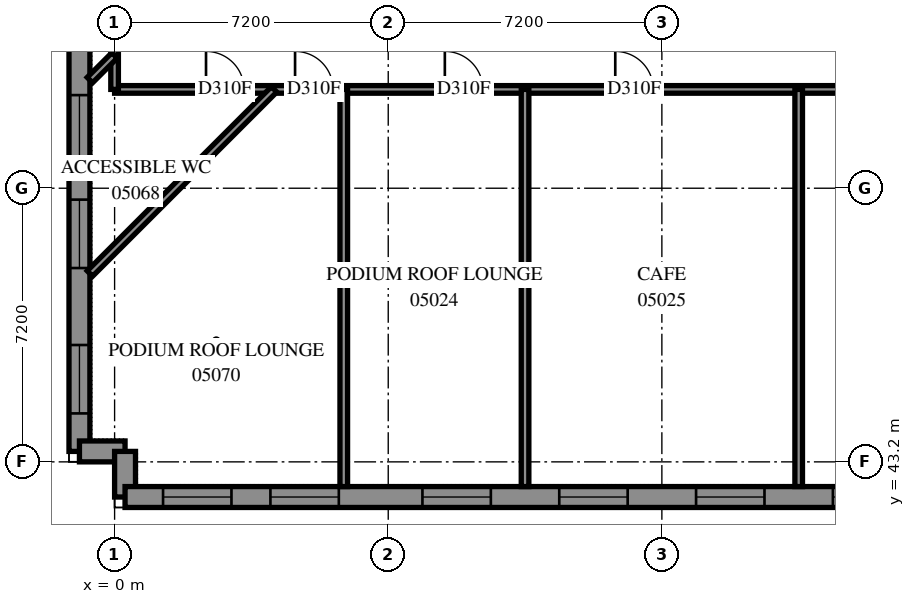
"""IFC4 building model, lengths in metres.
Left out: names, types, materials, properties, quantities, classifications, styles, units other than length and angle.
Written with IfcOpenShell. Run it as: python <this file> out.ifc"""

import sys

from ifc_helpers import new_model, si_unit, direction, frame, frame_2d, origin, place, context, subcontext, project, spatial, polyline, rectangle, outline, extrude, element, fill, save


model = new_model("IFC4")
c1 = context("Model", 3, precision=1e-05, world=origin(), true_north=direction((0.0, 1.0)))
c2 = subcontext(c1, "Body", "Model", "MODEL_VIEW")
j1 = project(units=[si_unit("LENGTHUNIT", "METRE"), si_unit("PLANEANGLEUNIT", "RADIAN")], contexts=[c1])
p1 = place(None, origin())
s1 = spatial("IfcSite", under=j1, at=p1, CompositionType="ELEMENT")
p2 = place(p1, origin())
s2 = spatial("IfcBuilding", under=s1, at=p2, CompositionType="ELEMENT")
p3 = place(p2, frame((0.0, 0.0, 22.8)))
s3 = spatial("IfcBuildingStorey", under=s2, at=p3, CompositionType="ELEMENT", Elevation=22.8)
p4 = place(p3, frame((-0.925, 71.725, 0.0), z_axis=(0.0, 0.0, 1.0), x_axis=(0.0, -1.0, 0.0)))
e1 = element("IfcWall", 1, at=p4, inside=s3, PredefinedType="SOLIDWALL", context=c2, shape_type="SweptSolid", body=[
    extrude(outline(polyline([(-0.275, -0.275), (28.525, -0.275), (27.975, 0.275), (0.275, 0.275), (-0.275, -0.275)])), origin(), (0.0, 0.0, 1.0), 3.9),
])
p5 = place(p4, frame((1.0, 0.0, 0.7)))
e2 = element("IfcOpeningElement", 2, at=p5, cuts=e1, PredefinedType="OPENING", context=c2, shape_type="SweptSolid", body=[
    extrude(rectangle(XDim=1.8, YDim=2.4, at=frame_2d((0.9, 1.2))), frame((0.0, 0.285, 0.0), z_axis=(0.0, -1.0, 0.0), x_axis=(1.0, 0.0, 0.0)), (0.0, 0.0, 1.0), 0.57),
])
p6 = place(p4, frame((4.225, 0.0, 0.7)))
e3 = element("IfcOpeningElement", 3, at=p6, cuts=e1, PredefinedType="OPENING", context=c2, shape_type="SweptSolid", body=[
    extrude(rectangle(XDim=1.8, YDim=2.4, at=frame_2d((0.9, 1.2))), frame((0.0, 0.285, 0.0), z_axis=(0.0, -1.0, 0.0), x_axis=(1.0, 0.0, 0.0)), (0.0, 0.0, 1.0), 0.57),
])
p7 = place(p4, frame((7.575, 0.0, 0.7)))
e4 = element("IfcOpeningElement", 4, at=p7, cuts=e1, PredefinedType="OPENING", context=c2, shape_type="SweptSolid", body=[
    extrude(rectangle(XDim=1.8, YDim=2.4, at=frame_2d((0.9, 1.2))), frame((0.0, 0.285, 0.0), z_axis=(0.0, -1.0, 0.0), x_axis=(1.0, 0.0, 0.0)), (0.0, 0.0, 1.0), 0.57),
])
p8 = place(p4, frame((14.775, 0.0, 0.7)))
e5 = element("IfcOpeningElement", 5, at=p8, cuts=e1, PredefinedType="OPENING", context=c2, shape_type="SweptSolid", body=[
    extrude(rectangle(XDim=1.8, YDim=2.4, at=frame_2d((0.9, 1.2))), frame((0.0, 0.285, 0.0), z_axis=(0.0, -1.0, 0.0), x_axis=(1.0, 0.0, 0.0)), (0.0, 0.0, 1.0), 0.57),
])
p9 = place(p4, frame((18.875, 0.0, 0.7)))
e6 = element("IfcOpeningElement", 6, at=p9, cuts=e1, PredefinedType="OPENING", context=c2, shape_type="SweptSolid", body=[
    extrude(rectangle(XDim=1.8, YDim=2.4, at=frame_2d((0.9, 1.2))), frame((0.0, 0.285, 0.0), z_axis=(0.0, -1.0, 0.0), x_axis=(1.0, 0.0, 0.0)), (0.0, 0.0, 1.0), 0.57),
])
p10 = place(p4, frame((21.625, 0.0, 0.7)))
e7 = element("IfcOpeningElement", 7, at=p10, cuts=e1, PredefinedType="OPENING", context=c2, shape_type="SweptSolid", body=[
    extrude(rectangle(XDim=1.8, YDim=2.4, at=frame_2d((0.9, 1.2))), frame((0.0, 0.285, 0.0), z_axis=(0.0, -1.0, 0.0), x_axis=(1.0, 0.0, 0.0)), (0.0, 0.0, 1.0), 0.57),
])
p11 = place(p4, frame((25.45, 0.0, 0.7)))
e8 = element("IfcOpeningElement", 8, at=p11, cuts=e1, PredefinedType="OPENING", context=c2, shape_type="SweptSolid", body=[
    extrude(rectangle(XDim=1.8, YDim=2.4, at=frame_2d((0.9, 1.2))), frame((0.0, 0.285, 0.0), z_axis=(0.0, -1.0, 0.0), x_axis=(1.0, 0.0, 0.0)), (0.0, 0.0, 1.0), 0.57),
])
p12 = place(p4, frame((11.775, 0.0, 0.45)))
e9 = element("IfcOpeningElement", 9, at=p12, cuts=e1, PredefinedType="OPENING", context=c2, shape_type="SweptSolid", body=[
    extrude(rectangle(XDim=1.3, YDim=2.5, at=frame_2d((0.65, 1.25))), frame((0.0, 0.285, 0.0), z_axis=(0.0, -1.0, 0.0), x_axis=(1.0, 0.0, 0.0)), (0.0, 0.0, 1.0), 0.57),
])
p13 = place(p3, frame((-0.925, 43.475, 0.0), z_axis=(0.0, 0.0, 1.0), x_axis=(1.0, 0.0, 0.0)))
e10 = element("IfcWall", 10, at=p13, inside=s3, PredefinedType="SOLIDWALL", context=c2, shape_type="SweptSolid", body=[
    extrude(outline(polyline([(-0.275, -0.275), (0.925, -0.275), (1.475, 0.275), (0.275, 0.275), (-0.275, -0.275)])), origin(), (0.0, 0.0, 1.0), 3.9),
])
p14 = place(p3, frame((0.275, 43.475, 0.0), z_axis=(0.0, 0.0, 1.0), x_axis=(0.0, -1.0, 0.0)))
e11 = element("IfcWall", 11, at=p14, inside=s3, PredefinedType="SOLIDWALL", context=c2, shape_type="SweptSolid", body=[
    extrude(outline(polyline([(0.275, -0.275), (1.475, -0.275), (0.925, 0.275), (-0.275, 0.275), (0.275, -0.275)])), origin(), (0.0, 0.0, 1.0), 3.9),
])
p15 = place(p3, frame((0.275, 42.275, 0.0), z_axis=(0.0, 0.0, 1.0), x_axis=(1.0, 0.0, 0.0)))
e12 = element("IfcWall", 12, at=p15, inside=s3, PredefinedType="SOLIDWALL", context=c2, shape_type="SweptSolid", body=[
    extrude(outline(polyline([(-0.275, -0.275), (76.681, -0.275), (76.909, 0.275), (0.275, 0.275), (-0.275, -0.275)])), origin(), (0.0, 0.0, 1.0), 3.9),
])
p16 = place(p15, frame((1.0, 0.0, 0.7)))
e13 = element("IfcOpeningElement", 13, at=p16, cuts=e12, PredefinedType="OPENING", context=c2, shape_type="SweptSolid", body=[
    extrude(rectangle(XDim=1.8, YDim=2.4, at=frame_2d((0.9, 1.2))), frame((0.0, 0.285, 0.0), z_axis=(0.0, -1.0, 0.0), x_axis=(1.0, 0.0, 0.0)), (0.0, 0.0, 1.0), 0.57),
])
p17 = place(p15, frame((3.825, 0.0, 0.7)))
e14 = element("IfcOpeningElement", 14, at=p17, cuts=e12, PredefinedType="OPENING", context=c2, shape_type="SweptSolid", body=[
    extrude(rectangle(XDim=1.8, YDim=2.4, at=frame_2d((0.9, 1.2))), frame((0.0, 0.285, 0.0), z_axis=(0.0, -1.0, 0.0), x_axis=(1.0, 0.0, 0.0)), (0.0, 0.0, 1.0), 0.57),
])
p18 = place(p15, frame((7.825, 0.0, 0.7)))
e15 = element("IfcOpeningElement", 15, at=p18, cuts=e12, PredefinedType="OPENING", context=c2, shape_type="SweptSolid", body=[
    extrude(rectangle(XDim=1.8, YDim=2.4, at=frame_2d((0.9, 1.2))), frame((0.0, 0.285, 0.0), z_axis=(0.0, -1.0, 0.0), x_axis=(1.0, 0.0, 0.0)), (0.0, 0.0, 1.0), 0.57),
])
p19 = place(p15, frame((11.425, 0.0, 0.7)))
e16 = element("IfcOpeningElement", 16, at=p19, cuts=e12, PredefinedType="OPENING", context=c2, shape_type="SweptSolid", body=[
    extrude(rectangle(XDim=1.8, YDim=2.4, at=frame_2d((0.9, 1.2))), frame((0.0, 0.285, 0.0), z_axis=(0.0, -1.0, 0.0), x_axis=(1.0, 0.0, 0.0)), (0.0, 0.0, 1.0), 0.57),
])
p20 = place(p15, frame((15.025, 0.0, 0.7)))
e17 = element("IfcOpeningElement", 17, at=p20, cuts=e12, PredefinedType="OPENING", context=c2, shape_type="SweptSolid", body=[
    extrude(rectangle(XDim=1.8, YDim=2.4, at=frame_2d((0.9, 1.2))), frame((0.0, 0.285, 0.0), z_axis=(0.0, -1.0, 0.0), x_axis=(1.0, 0.0, 0.0)), (0.0, 0.0, 1.0), 0.57),
])
p21 = place(p15, frame((18.625, 0.0, 0.7)))
e18 = element("IfcOpeningElement", 18, at=p21, cuts=e12, PredefinedType="OPENING", context=c2, shape_type="SweptSolid", body=[
    extrude(rectangle(XDim=1.8, YDim=2.4, at=frame_2d((0.9, 1.2))), frame((0.0, 0.285, 0.0), z_axis=(0.0, -1.0, 0.0), x_axis=(1.0, 0.0, 0.0)), (0.0, 0.0, 1.0), 0.57),
])
p22 = place(p15, frame((22.225, 0.0, 0.7)))
e19 = element("IfcOpeningElement", 19, at=p22, cuts=e12, PredefinedType="OPENING", context=c2, shape_type="SweptSolid", body=[
    extrude(rectangle(XDim=1.8, YDim=2.4, at=frame_2d((0.9, 1.2))), frame((0.0, 0.285, 0.0), z_axis=(0.0, -1.0, 0.0), x_axis=(1.0, 0.0, 0.0)), (0.0, 0.0, 1.0), 0.57),
])
p23 = place(p15, frame((25.825, 0.0, 0.7)))
e20 = element("IfcOpeningElement", 20, at=p23, cuts=e12, PredefinedType="OPENING", context=c2, shape_type="SweptSolid", body=[
    extrude(rectangle(XDim=1.8, YDim=2.4, at=frame_2d((0.9, 1.2))), frame((0.0, 0.285, 0.0), z_axis=(0.0, -1.0, 0.0), x_axis=(1.0, 0.0, 0.0)), (0.0, 0.0, 1.0), 0.57),
])
p24 = place(p15, frame((29.425, 0.0, 0.7)))
e21 = element("IfcOpeningElement", 21, at=p24, cuts=e12, PredefinedType="OPENING", context=c2, shape_type="SweptSolid", body=[
    extrude(rectangle(XDim=1.8, YDim=2.4, at=frame_2d((0.9, 1.2))), frame((0.0, 0.285, 0.0), z_axis=(0.0, -1.0, 0.0), x_axis=(1.0, 0.0, 0.0)), (0.0, 0.0, 1.0), 0.57),
])
p25 = place(p15, frame((33.025, 0.0, 0.7)))
e22 = element("IfcOpeningElement", 22, at=p25, cuts=e12, PredefinedType="OPENING", context=c2, shape_type="SweptSolid", body=[
    extrude(rectangle(XDim=1.8, YDim=2.4, at=frame_2d((0.9, 1.2))), frame((0.0, 0.285, 0.0), z_axis=(0.0, -1.0, 0.0), x_axis=(1.0, 0.0, 0.0)), (0.0, 0.0, 1.0), 0.57),
])
p26 = place(p15, frame((36.625, 0.0, 0.7)))
e23 = element("IfcOpeningElement", 23, at=p26, cuts=e12, PredefinedType="OPENING", context=c2, shape_type="SweptSolid", body=[
    extrude(rectangle(XDim=1.8, YDim=2.4, at=frame_2d((0.9, 1.2))), frame((0.0, 0.285, 0.0), z_axis=(0.0, -1.0, 0.0), x_axis=(1.0, 0.0, 0.0)), (0.0, 0.0, 1.0), 0.57),
])
p27 = place(p15, frame((40.225, 0.0, 0.7)))
e24 = element("IfcOpeningElement", 24, at=p27, cuts=e12, PredefinedType="OPENING", context=c2, shape_type="SweptSolid", body=[
    extrude(rectangle(XDim=1.8, YDim=2.4, at=frame_2d((0.9, 1.2))), frame((0.0, 0.285, 0.0), z_axis=(0.0, -1.0, 0.0), x_axis=(1.0, 0.0, 0.0)), (0.0, 0.0, 1.0), 0.57),
])
p28 = place(p15, frame((43.825, 0.0, 0.7)))
e25 = element("IfcOpeningElement", 25, at=p28, cuts=e12, PredefinedType="OPENING", context=c2, shape_type="SweptSolid", body=[
    extrude(rectangle(XDim=1.8, YDim=2.4, at=frame_2d((0.9, 1.2))), frame((0.0, 0.285, 0.0), z_axis=(0.0, -1.0, 0.0), x_axis=(1.0, 0.0, 0.0)), (0.0, 0.0, 1.0), 0.57),
])
p29 = place(p15, frame((47.425, 0.0, 0.7)))
e26 = element("IfcOpeningElement", 26, at=p29, cuts=e12, PredefinedType="OPENING", context=c2, shape_type="SweptSolid", body=[
    extrude(rectangle(XDim=1.8, YDim=2.4, at=frame_2d((0.9, 1.2))), frame((0.0, 0.285, 0.0), z_axis=(0.0, -1.0, 0.0), x_axis=(1.0, 0.0, 0.0)), (0.0, 0.0, 1.0), 0.57),
])
p30 = place(p15, frame((51.025, 0.0, 0.7)))
e27 = element("IfcOpeningElement", 27, at=p30, cuts=e12, PredefinedType="OPENING", context=c2, shape_type="SweptSolid", body=[
    extrude(rectangle(XDim=1.8, YDim=2.4, at=frame_2d((0.9, 1.2))), frame((0.0, 0.285, 0.0), z_axis=(0.0, -1.0, 0.0), x_axis=(1.0, 0.0, 0.0)), (0.0, 0.0, 1.0), 0.57),
])
p31 = place(p15, frame((54.625, 0.0, 0.7)))
e28 = element("IfcOpeningElement", 28, at=p31, cuts=e12, PredefinedType="OPENING", context=c2, shape_type="SweptSolid", body=[
    extrude(rectangle(XDim=1.8, YDim=2.4, at=frame_2d((0.9, 1.2))), frame((0.0, 0.285, 0.0), z_axis=(0.0, -1.0, 0.0), x_axis=(1.0, 0.0, 0.0)), (0.0, 0.0, 1.0), 0.57),
])
p32 = place(p15, frame((58.225, 0.0, 0.7)))
e29 = element("IfcOpeningElement", 29, at=p32, cuts=e12, PredefinedType="OPENING", context=c2, shape_type="SweptSolid", body=[
    extrude(rectangle(XDim=1.8, YDim=2.4, at=frame_2d((0.9, 1.2))), frame((0.0, 0.285, 0.0), z_axis=(0.0, -1.0, 0.0), x_axis=(1.0, 0.0, 0.0)), (0.0, 0.0, 1.0), 0.57),
])
p33 = place(p15, frame((61.825, 0.0, 0.7)))
e30 = element("IfcOpeningElement", 30, at=p33, cuts=e12, PredefinedType="OPENING", context=c2, shape_type="SweptSolid", body=[
    extrude(rectangle(XDim=1.8, YDim=2.4, at=frame_2d((0.9, 1.2))), frame((0.0, 0.285, 0.0), z_axis=(0.0, -1.0, 0.0), x_axis=(1.0, 0.0, 0.0)), (0.0, 0.0, 1.0), 0.57),
])
p34 = place(p15, frame((65.425, 0.0, 0.7)))
e31 = element("IfcOpeningElement", 31, at=p34, cuts=e12, PredefinedType="OPENING", context=c2, shape_type="SweptSolid", body=[
    extrude(rectangle(XDim=1.8, YDim=2.4, at=frame_2d((0.9, 1.2))), frame((0.0, 0.285, 0.0), z_axis=(0.0, -1.0, 0.0), x_axis=(1.0, 0.0, 0.0)), (0.0, 0.0, 1.0), 0.57),
])
p35 = place(p15, frame((69.025, 0.0, 0.7)))
e32 = element("IfcOpeningElement", 32, at=p35, cuts=e12, PredefinedType="OPENING", context=c2, shape_type="SweptSolid", body=[
    extrude(rectangle(XDim=1.8, YDim=2.4, at=frame_2d((0.9, 1.2))), frame((0.0, 0.285, 0.0), z_axis=(0.0, -1.0, 0.0), x_axis=(1.0, 0.0, 0.0)), (0.0, 0.0, 1.0), 0.57),
])
p36 = place(p15, frame((72.625, 0.0, 0.7)))
e33 = element("IfcOpeningElement", 33, at=p36, cuts=e12, PredefinedType="OPENING", context=c2, shape_type="SweptSolid", body=[
    extrude(rectangle(XDim=1.8, YDim=2.4, at=frame_2d((0.9, 1.2))), frame((0.0, 0.285, 0.0), z_axis=(0.0, -1.0, 0.0), x_axis=(1.0, 0.0, 0.0)), (0.0, 0.0, 1.0), 0.57),
])
p37 = place(p3, frame((0.0, 53.0, 0.0), z_axis=(0.0, 0.0, 1.0), x_axis=(1.0, 0.0, 0.0)))
e34 = element("IfcWall", 34, at=p37, inside=s3, PredefinedType="PARTITIONING", context=c2, shape_type="SweptSolid", body=[
    extrude(rectangle(XDim=54.6, YDim=0.2, at=frame_2d((27.3, 0.0))), origin(), (0.0, 0.0, 1.0), 3.9),
])
p38 = place(p37, frame((8.689, 0.0, 0.0)))
e35 = element("IfcOpeningElement", 35, at=p38, cuts=e34, PredefinedType="OPENING", context=c2, shape_type="SweptSolid", body=[
    extrude(rectangle(XDim=1.0, YDim=2.1, at=frame_2d((0.5, 1.05))), frame((0.0, 0.11, 0.0), z_axis=(0.0, -1.0, 0.0), x_axis=(1.0, 0.0, 0.0)), (0.0, 0.0, 1.0), 0.22),
])
p39 = place(p37, frame((13.174, 0.0, 0.0)))
e36 = element("IfcOpeningElement", 36, at=p39, cuts=e34, PredefinedType="OPENING", context=c2, shape_type="SweptSolid", body=[
    extrude(rectangle(XDim=1.0, YDim=2.1, at=frame_2d((0.5, 1.05))), frame((0.0, 0.11, 0.0), z_axis=(0.0, -1.0, 0.0), x_axis=(1.0, 0.0, 0.0)), (0.0, 0.0, 1.0), 0.22),
])
p40 = place(p37, frame((20.374, 0.0, 0.0)))
e37 = element("IfcOpeningElement", 37, at=p40, cuts=e34, PredefinedType="OPENING", context=c2, shape_type="SweptSolid", body=[
    extrude(rectangle(XDim=1.0, YDim=2.1, at=frame_2d((0.5, 1.05))), frame((0.0, 0.11, 0.0), z_axis=(0.0, -1.0, 0.0), x_axis=(1.0, 0.0, 0.0)), (0.0, 0.0, 1.0), 0.22),
])
p41 = place(p37, frame((27.574, 0.0, 0.0)))
e38 = element("IfcOpeningElement", 38, at=p41, cuts=e34, PredefinedType="OPENING", context=c2, shape_type="SweptSolid", body=[
    extrude(rectangle(XDim=1.0, YDim=2.1, at=frame_2d((0.5, 1.05))), frame((0.0, 0.11, 0.0), z_axis=(0.0, -1.0, 0.0), x_axis=(1.0, 0.0, 0.0)), (0.0, 0.0, 1.0), 0.22),
])
p42 = place(p37, frame((34.774, 0.0, 0.0)))
e39 = element("IfcOpeningElement", 39, at=p42, cuts=e34, PredefinedType="OPENING", context=c2, shape_type="SweptSolid", body=[
    extrude(rectangle(XDim=1.0, YDim=2.1, at=frame_2d((0.5, 1.05))), frame((0.0, 0.11, 0.0), z_axis=(0.0, -1.0, 0.0), x_axis=(1.0, 0.0, 0.0)), (0.0, 0.0, 1.0), 0.22),
])
p43 = place(p37, frame((41.974, 0.0, 0.0)))
e40 = element("IfcOpeningElement", 40, at=p43, cuts=e34, PredefinedType="OPENING", context=c2, shape_type="SweptSolid", body=[
    extrude(rectangle(XDim=1.0, YDim=2.1, at=frame_2d((0.5, 1.05))), frame((0.0, 0.11, 0.0), z_axis=(0.0, -1.0, 0.0), x_axis=(1.0, 0.0, 0.0)), (0.0, 0.0, 1.0), 0.22),
])
p44 = place(p37, frame((49.174, 0.0, 0.0)))
e41 = element("IfcOpeningElement", 41, at=p44, cuts=e34, PredefinedType="OPENING", context=c2, shape_type="SweptSolid", body=[
    extrude(rectangle(XDim=1.0, YDim=2.1, at=frame_2d((0.5, 1.05))), frame((0.0, 0.11, 0.0), z_axis=(0.0, -1.0, 0.0), x_axis=(1.0, 0.0, 0.0)), (0.0, 0.0, 1.0), 0.22),
])
p45 = place(p37, frame((2.406, 0.0, 0.0)))
e42 = element("IfcOpeningElement", 42, at=p45, cuts=e34, PredefinedType="OPENING", context=c2, shape_type="SweptSolid", body=[
    extrude(rectangle(XDim=1.0, YDim=2.1, at=frame_2d((0.5, 1.05))), frame((0.0, 0.11, 0.0), z_axis=(0.0, -1.0, 0.0), x_axis=(1.0, 0.0, 0.0)), (0.0, 0.0, 1.0), 0.22),
])
p46 = place(p37, frame((4.748, 0.0, 0.0)))
e43 = element("IfcOpeningElement", 43, at=p46, cuts=e34, PredefinedType="OPENING", context=c2, shape_type="SweptSolid", body=[
    extrude(rectangle(XDim=1.0, YDim=2.1, at=frame_2d((0.5, 1.05))), frame((0.0, 0.11, 0.0), z_axis=(0.0, -1.0, 0.0), x_axis=(1.0, 0.0, 0.0)), (0.0, 0.0, 1.0), 0.22),
])
for number, where, z_axis, x_axis in (
    (44, (6.03, 42.55, 0.0), (0.0, 0.0, 1.0), (0.0, 1.0, 0.0)),
    (45, (10.8, 42.55, 0.0), (0.0, 0.0, 1.0), (0.0, 1.0, 0.0)),
    (46, (18.0, 42.55, 0.0), (0.0, 0.0, 1.0), (0.0, 1.0, 0.0)),
):
    element("IfcWall", number, at=place(p3, frame(where, z_axis=z_axis, x_axis=x_axis)), inside=s3, PredefinedType="PARTITIONING", context=c2, shape_type="SweptSolid", body=[
        extrude(rectangle(XDim=10.45, YDim=0.2, at=frame_2d((5.225, 0.0))), origin(), (0.0, 0.0, 1.0), 3.9),
    ])
p47 = place(p3, frame((-0.65, 48.154, 0.0), z_axis=(0.0, 0.0, 1.0), x_axis=(0.7070994865, 0.7071140758, 0.0)))
e47 = element("IfcWall", 47, at=p47, inside=s3, PredefinedType="PARTITIONING", context=c2, shape_type="SweptSolid", body=[
    extrude(rectangle(XDim=6.854, YDim=0.2, at=frame_2d((3.427, 0.0))), origin(), (0.0, 0.0, 1.0), 3.9),
])
p48 = place(p3, frame((0.0, 53.0, 0.0), z_axis=(0.0, 0.0, 1.0), x_axis=(0.0, 1.0, 0.0)))
e48 = element("IfcWall", 48, at=p48, inside=s3, PredefinedType="PARTITIONING", context=c2, shape_type="SweptSolid", body=[
    extrude(rectangle(XDim=2.0, YDim=0.2, at=frame_2d((1.0, 0.0))), origin(), (0.0, 0.0, 1.0), 3.9),
])
p49 = place(p3, frame((-0.65, 53.246, 0.0), z_axis=(0.0, 0.0, 1.0), x_axis=(0.7071612431, 0.707052315, 0.0)))
e49 = element("IfcWall", 49, at=p49, inside=s3, PredefinedType="PARTITIONING", context=c2, shape_type="SweptSolid", body=[
    extrude(rectangle(XDim=0.918, YDim=0.2, at=frame_2d((0.459, 0.0))), origin(), (0.0, 0.0, 1.0), 3.9),
])
p50 = place(p9, origin())
e50 = element("IfcWindow", 50, at=p50, inside=s3, PartitioningType="SINGLE_PANEL", PredefinedType="WINDOW", context=c2, shape_type="SweptSolid", body=[
    extrude(rectangle(XDim=1.8, YDim=2.4, at=frame_2d((0.9, 1.2))), frame((0.0, 0.155, 0.0), z_axis=(0.0, -1.0, 0.0), x_axis=(1.0, 0.0, 0.0)), (0.0, 0.0, 1.0), 0.06),
])
fill(e6, e50)
p51 = place(p10, origin())
e51 = element("IfcWindow", 51, at=p51, inside=s3, PartitioningType="SINGLE_PANEL", PredefinedType="WINDOW", context=c2, shape_type="SweptSolid", body=[
    extrude(rectangle(XDim=1.8, YDim=2.4, at=frame_2d((0.9, 1.2))), frame((0.0, 0.155, 0.0), z_axis=(0.0, -1.0, 0.0), x_axis=(1.0, 0.0, 0.0)), (0.0, 0.0, 1.0), 0.06),
])
fill(e7, e51)
p52 = place(p11, origin())
e52 = element("IfcWindow", 52, at=p52, inside=s3, PartitioningType="SINGLE_PANEL", PredefinedType="WINDOW", context=c2, shape_type="SweptSolid", body=[
    extrude(rectangle(XDim=1.8, YDim=2.4, at=frame_2d((0.9, 1.2))), frame((0.0, 0.155, 0.0), z_axis=(0.0, -1.0, 0.0), x_axis=(1.0, 0.0, 0.0)), (0.0, 0.0, 1.0), 0.06),
])
fill(e8, e52)
p53 = place(p16, origin())
e53 = element("IfcWindow", 53, at=p53, inside=s3, PartitioningType="SINGLE_PANEL", PredefinedType="WINDOW", context=c2, shape_type="SweptSolid", body=[
    extrude(rectangle(XDim=1.8, YDim=2.4, at=frame_2d((0.9, 1.2))), frame((0.0, 0.155, 0.0), z_axis=(0.0, -1.0, 0.0), x_axis=(1.0, 0.0, 0.0)), (0.0, 0.0, 1.0), 0.06),
])
fill(e13, e53)
p54 = place(p17, origin())
e54 = element("IfcWindow", 54, at=p54, inside=s3, PartitioningType="SINGLE_PANEL", PredefinedType="WINDOW", context=c2, shape_type="SweptSolid", body=[
    extrude(rectangle(XDim=1.8, YDim=2.4, at=frame_2d((0.9, 1.2))), frame((0.0, 0.155, 0.0), z_axis=(0.0, -1.0, 0.0), x_axis=(1.0, 0.0, 0.0)), (0.0, 0.0, 1.0), 0.06),
])
fill(e14, e54)
p55 = place(p18, origin())
e55 = element("IfcWindow", 55, at=p55, inside=s3, PartitioningType="SINGLE_PANEL", PredefinedType="WINDOW", context=c2, shape_type="SweptSolid", body=[
    extrude(rectangle(XDim=1.8, YDim=2.4, at=frame_2d((0.9, 1.2))), frame((0.0, 0.155, 0.0), z_axis=(0.0, -1.0, 0.0), x_axis=(1.0, 0.0, 0.0)), (0.0, 0.0, 1.0), 0.06),
])
fill(e15, e55)
p56 = place(p19, origin())
e56 = element("IfcWindow", 56, at=p56, inside=s3, PartitioningType="SINGLE_PANEL", PredefinedType="WINDOW", context=c2, shape_type="SweptSolid", body=[
    extrude(rectangle(XDim=1.8, YDim=2.4, at=frame_2d((0.9, 1.2))), frame((0.0, 0.155, 0.0), z_axis=(0.0, -1.0, 0.0), x_axis=(1.0, 0.0, 0.0)), (0.0, 0.0, 1.0), 0.06),
])
fill(e16, e56)
p57 = place(p20, origin())
e57 = element("IfcWindow", 57, at=p57, inside=s3, PartitioningType="SINGLE_PANEL", PredefinedType="WINDOW", context=c2, shape_type="SweptSolid", body=[
    extrude(rectangle(XDim=1.8, YDim=2.4, at=frame_2d((0.9, 1.2))), frame((0.0, 0.155, 0.0), z_axis=(0.0, -1.0, 0.0), x_axis=(1.0, 0.0, 0.0)), (0.0, 0.0, 1.0), 0.06),
])
fill(e17, e57)
p58 = place(p21, origin())
e58 = element("IfcWindow", 58, at=p58, inside=s3, PartitioningType="SINGLE_PANEL", PredefinedType="WINDOW", context=c2, shape_type="SweptSolid", body=[
    extrude(rectangle(XDim=1.8, YDim=2.4, at=frame_2d((0.9, 1.2))), frame((0.0, 0.155, 0.0), z_axis=(0.0, -1.0, 0.0), x_axis=(1.0, 0.0, 0.0)), (0.0, 0.0, 1.0), 0.06),
])
fill(e18, e58)
p59 = place(p38, origin())
e59 = element("IfcDoor", 59, at=p59, inside=s3, OperationType="SINGLE_SWING_LEFT", PredefinedType="DOOR", context=c2, shape_type="SweptSolid", body=[
    extrude(rectangle(XDim=1.0, YDim=2.1, at=frame_2d((0.5, 1.05))), frame((0.0, 0.025, 0.0), z_axis=(0.0, -1.0, 0.0), x_axis=(1.0, 0.0, 0.0)), (0.0, 0.0, 1.0), 0.05),
])
fill(e35, e59)
p60 = place(p39, origin())
e60 = element("IfcDoor", 60, at=p60, inside=s3, OperationType="SINGLE_SWING_RIGHT", PredefinedType="DOOR", context=c2, shape_type="SweptSolid", body=[
    extrude(rectangle(XDim=1.0, YDim=2.1, at=frame_2d((0.5, 1.05))), frame((0.0, 0.025, 0.0), z_axis=(0.0, -1.0, 0.0), x_axis=(1.0, 0.0, 0.0)), (0.0, 0.0, 1.0), 0.05),
])
fill(e36, e60)
p61 = place(p45, origin())
e61 = element("IfcDoor", 61, at=p61, inside=s3, OperationType="SINGLE_SWING_RIGHT", PredefinedType="DOOR", context=c2, shape_type="SweptSolid", body=[
    extrude(rectangle(XDim=1.0, YDim=2.1, at=frame_2d((0.5, 1.05))), frame((0.0, 0.025, 0.0), z_axis=(0.0, -1.0, 0.0), x_axis=(1.0, 0.0, 0.0)), (0.0, 0.0, 1.0), 0.05),
])
fill(e42, e61)
p62 = place(p46, origin())
e62 = element("IfcDoor", 62, at=p62, inside=s3, OperationType="SINGLE_SWING_LEFT", PredefinedType="DOOR", context=c2, shape_type="SweptSolid", body=[
    extrude(rectangle(XDim=1.0, YDim=2.1, at=frame_2d((0.5, 1.05))), frame((0.0, 0.025, 0.0), z_axis=(0.0, -1.0, 0.0), x_axis=(1.0, 0.0, 0.0)), (0.0, 0.0, 1.0), 0.05),
])
fill(e43, e62)
save(model, sys.argv[1])
